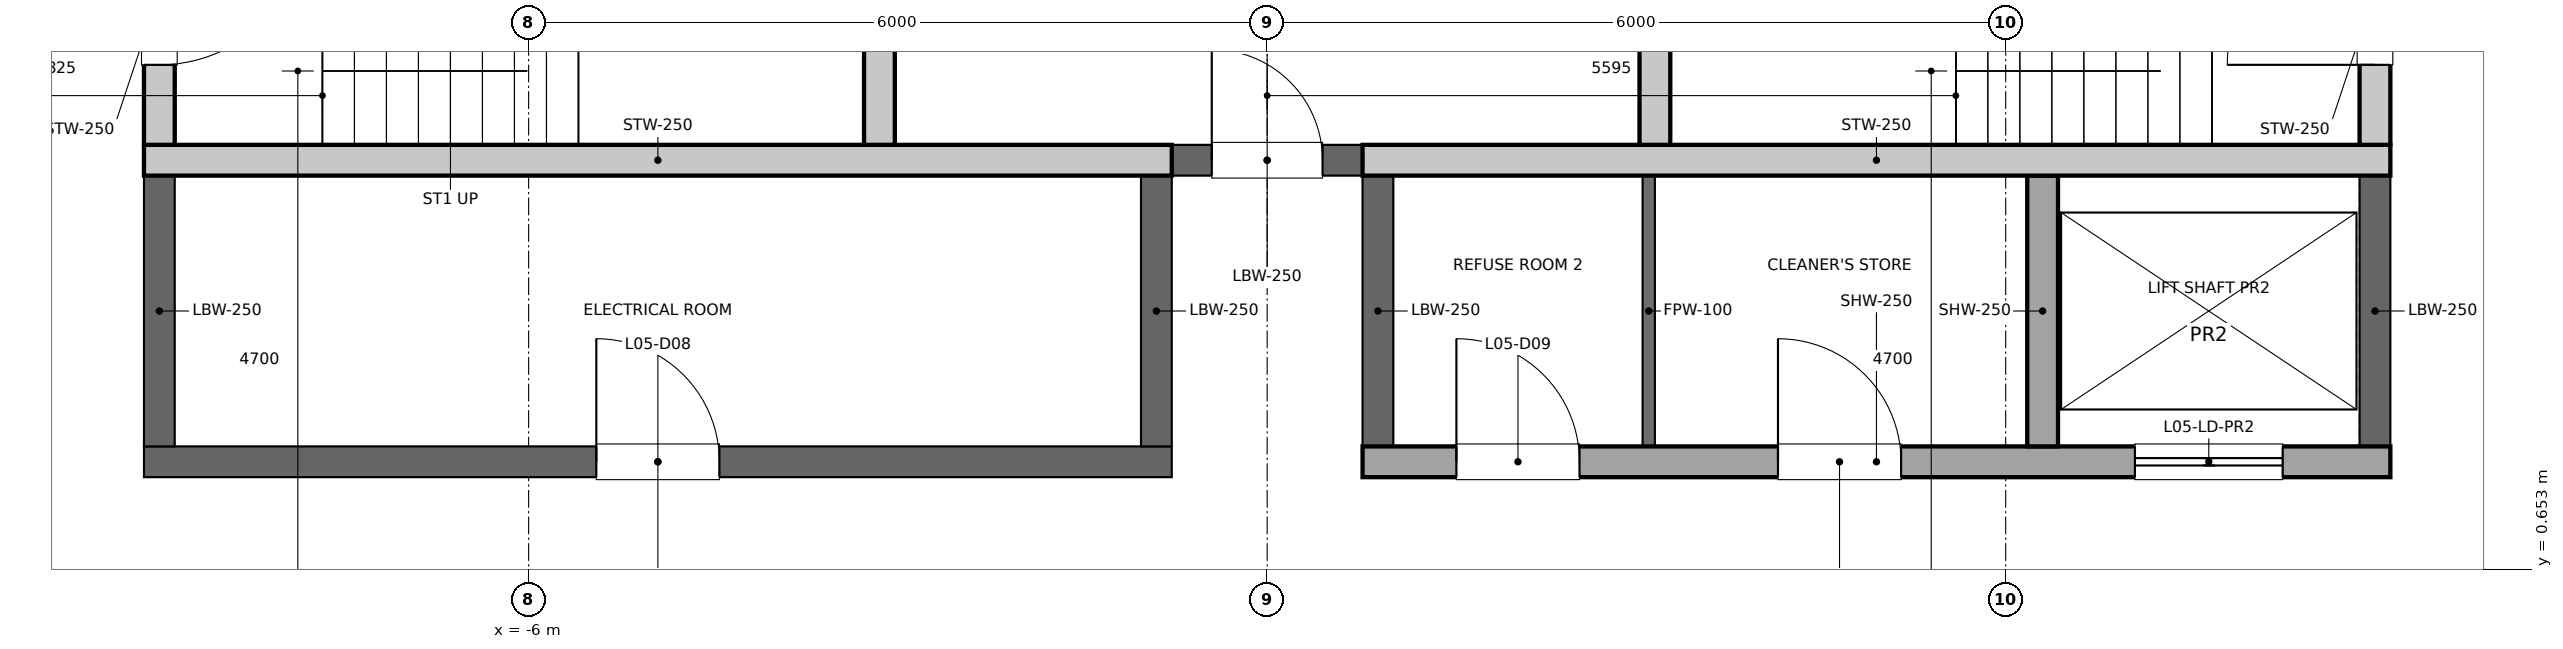
"""IFC4 building model, lengths in metres.
Left out: names, types, materials, properties, quantities, classifications, styles, units other than length and angle.
Written with IfcOpenShell. Run it as: python <this file> out.ifc"""

import sys

from ifc_helpers import new_model, si_unit, direction, frame, frame_2d, origin, place, context, subcontext, project, spatial, rectangle, extrude, element, fill, save


model = new_model("IFC4")
c1 = context("Model", 3, precision=1e-05, world=origin(), true_north=direction((0.0, 1.0)))
c2 = subcontext(c1, "Body", "Model", "MODEL_VIEW")
j1 = project(units=[si_unit("LENGTHUNIT", "METRE"), si_unit("PLANEANGLEUNIT", "RADIAN")], contexts=[c1])
p1 = place(None, origin())
s1 = spatial("IfcSite", under=j1, at=p1, CompositionType="ELEMENT")
p2 = place(p1, origin())
s2 = spatial("IfcBuilding", under=s1, at=p2, CompositionType="ELEMENT")
p3 = place(p2, frame((0.0, 0.0, 37.4)))
s3 = spatial("IfcBuildingStorey", under=s2, at=p3, CompositionType="ELEMENT", Elevation=37.4)
p4 = place(p3, frame((-9.0, 4.1, 0.0), z_axis=(0.0, 0.0, 1.0), x_axis=(0.0, 1.0, 0.0)))
e1 = element("IfcWall", 1, at=p4, inside=s3, PredefinedType="SOLIDWALL", context=c2, shape_type="SweptSolid", body=[
    extrude(rectangle(XDim=2.5, YDim=0.25, at=frame_2d((1.25, 0.0))), origin(), (0.0, 0.0, 1.0), 6.25),
])
p5 = place(p4, frame((0.65, 0.0, 0.0)))
e2 = element("IfcOpeningElement", 2, at=p5, cuts=e1, PredefinedType="OPENING", context=c2, shape_type="SweptSolid", body=[
    extrude(rectangle(XDim=1.2, YDim=2.1, at=frame_2d((0.6, 1.05))), frame((0.0, 0.125, 0.0), z_axis=(0.0, -1.0, 0.0), x_axis=(1.0, 0.0, 0.0)), (0.0, 0.0, 1.0), 0.25),
])
p6 = place(p3, frame((9.0, 4.1, 0.0), z_axis=(0.0, 0.0, 1.0), x_axis=(0.0, 1.0, 0.0)))
e3 = element("IfcWall", 3, at=p6, inside=s3, PredefinedType="SOLIDWALL", context=c2, shape_type="SweptSolid", body=[
    extrude(rectangle(XDim=2.5, YDim=0.25, at=frame_2d((1.25, 0.0))), origin(), (0.0, 0.0, 1.0), 6.25),
])
p7 = place(p6, frame((0.65, 0.0, 0.0)))
e4 = element("IfcOpeningElement", 4, at=p7, cuts=e3, PredefinedType="OPENING", context=c2, shape_type="SweptSolid", body=[
    extrude(rectangle(XDim=1.2, YDim=2.1, at=frame_2d((0.6, 1.05))), frame((0.0, 0.125, 0.0), z_axis=(0.0, -1.0, 0.0), x_axis=(1.0, 0.0, 0.0)), (0.0, 0.0, 1.0), 0.25),
])
for number, where, z_axis, x_axis in (
    (5, (-3.15, 4.1, 0.0), (0.0, 0.0, 1.0), (0.0, 1.0, 0.0)),
    (6, (3.15, 4.1, 0.0), (0.0, 0.0, 1.0), (0.0, 1.0, 0.0)),
):
    element("IfcWall", number, at=place(p3, frame(where, z_axis=z_axis, x_axis=x_axis)), inside=s3, PredefinedType="SOLIDWALL", context=c2, shape_type="SweptSolid", body=[
        extrude(rectangle(XDim=2.5, YDim=0.25, at=frame_2d((1.25, 0.0))), origin(), (0.0, 0.0, 1.0), 6.25),
    ])
p8 = place(p3, frame((-0.775, 3.975, 0.0), z_axis=(0.0, 0.0, 1.0), x_axis=(1.0, 0.0, 0.0)))
e7 = element("IfcWall", 7, at=p8, inside=s3, PredefinedType="PARTITIONING", context=c2, shape_type="SweptSolid", body=[
    extrude(rectangle(XDim=1.55, YDim=0.25, at=frame_2d((0.775, 0.0))), origin(), (0.0, 0.0, 1.0), 6.25),
])
p9 = place(p8, frame((0.325, 0.0, 0.0)))
e8 = element("IfcOpeningElement", 8, at=p9, cuts=e7, PredefinedType="OPENING", context=c2, shape_type="SweptSolid", body=[
    extrude(rectangle(XDim=0.9, YDim=2.1, at=frame_2d((0.45, 1.05))), frame((0.0, 0.125, 0.0), z_axis=(0.0, -1.0, 0.0), x_axis=(1.0, 0.0, 0.0)), (0.0, 0.0, 1.0), 0.25),
])
p10 = place(p3, frame((-9.125, 1.525, 0.0), z_axis=(0.0, 0.0, 1.0), x_axis=(1.0, 0.0, 0.0)))
e9 = element("IfcWall", 9, at=p10, inside=s3, PredefinedType="PARTITIONING", context=c2, shape_type="SweptSolid", body=[
    extrude(rectangle(XDim=8.35, YDim=0.25, at=frame_2d((4.175, 0.0))), origin(), (0.0, 0.0, 1.0), 6.25),
])
p11 = place(p10, frame((3.675, 0.0, 0.0)))
e10 = element("IfcOpeningElement", 10, at=p11, cuts=e9, PredefinedType="OPENING", context=c2, shape_type="SweptSolid", body=[
    extrude(rectangle(XDim=1.0, YDim=2.1, at=frame_2d((0.5, 1.05))), frame((0.0, 0.125, 0.0), z_axis=(0.0, -1.0, 0.0), x_axis=(1.0, 0.0, 0.0)), (0.0, 0.0, 1.0), 0.25),
])
p12 = place(p3, frame((0.775, 1.525, 0.0), z_axis=(0.0, 0.0, 1.0), x_axis=(1.0, 0.0, 0.0)))
e11 = element("IfcWall", 11, at=p12, inside=s3, PredefinedType="SOLIDWALL", context=c2, shape_type="SweptSolid", body=[
    extrude(rectangle(XDim=8.35, YDim=0.25, at=frame_2d((4.175, 0.0))), origin(), (0.0, 0.0, 1.0), 6.25),
])
p13 = place(p12, frame((6.275, 0.0, 0.0)))
e12 = element("IfcOpeningElement", 12, at=p13, cuts=e11, PredefinedType="OPENING", context=c2, shape_type="SweptSolid", body=[
    extrude(rectangle(XDim=1.2, YDim=2.1, at=frame_2d((0.6, 1.05))), frame((0.0, 0.125, 0.0), z_axis=(0.0, -1.0, 0.0), x_axis=(1.0, 0.0, 0.0)), (0.0, 0.0, 1.0), 0.25),
])
p14 = place(p12, frame((0.762, 0.0, 0.0)))
e13 = element("IfcOpeningElement", 13, at=p14, cuts=e11, PredefinedType="OPENING", context=c2, shape_type="SweptSolid", body=[
    extrude(rectangle(XDim=1.0, YDim=2.1, at=frame_2d((0.5, 1.05))), frame((0.0, 0.125, 0.0), z_axis=(0.0, -1.0, 0.0), x_axis=(1.0, 0.0, 0.0)), (0.0, 0.0, 1.0), 0.25),
])
p15 = place(p12, frame((3.375, 0.0, 0.0)))
e14 = element("IfcOpeningElement", 14, at=p15, cuts=e11, PredefinedType="OPENING", context=c2, shape_type="SweptSolid", body=[
    extrude(rectangle(XDim=1.0, YDim=2.1, at=frame_2d((0.5, 1.05))), frame((0.0, 0.125, 0.0), z_axis=(0.0, -1.0, 0.0), x_axis=(1.0, 0.0, 0.0)), (0.0, 0.0, 1.0), 0.25),
])
p16 = place(p3, frame((6.3, 1.65, 0.0), z_axis=(0.0, 0.0, 1.0), x_axis=(0.0, 1.0, 0.0)))
e15 = element("IfcWall", 15, at=p16, inside=s3, PredefinedType="SOLIDWALL", context=c2, shape_type="SweptSolid", body=[
    extrude(rectangle(XDim=2.2, YDim=0.25, at=frame_2d((1.1, 0.0))), origin(), (0.0, 0.0, 1.0), 6.25),
])
for number, where, z_axis, x_axis in (
    (16, (-9.125, 3.975, 0.0), (0.0, 0.0, 1.0), (1.0, 0.0, 0.0)),
    (17, (0.775, 3.975, 0.0), (0.0, 0.0, 1.0), (1.0, 0.0, 0.0)),
):
    element("IfcWall", number, at=place(p3, frame(where, z_axis=z_axis, x_axis=x_axis)), inside=s3, PredefinedType="SOLIDWALL", context=c2, shape_type="SweptSolid", body=[
        extrude(rectangle(XDim=8.35, YDim=0.25, at=frame_2d((4.175, 0.0))), origin(), (0.0, 0.0, 1.0), 6.25),
    ])
for number, where, z_axis, x_axis in (
    (18, (-9.0, 1.65, 0.0), (0.0, 0.0, 1.0), (0.0, 1.0, 0.0)),
    (19, (-0.9, 1.65, 0.0), (0.0, 0.0, 1.0), (0.0, 1.0, 0.0)),
    (20, (9.0, 1.65, 0.0), (0.0, 0.0, 1.0), (0.0, 1.0, 0.0)),
    (21, (0.9, 1.65, 0.0), (0.0, 0.0, 1.0), (0.0, 1.0, 0.0)),
):
    element("IfcWall", number, at=place(p3, frame(where, z_axis=z_axis, x_axis=x_axis)), inside=s3, PredefinedType="PARTITIONING", context=c2, shape_type="SweptSolid", body=[
        extrude(rectangle(XDim=2.2, YDim=0.25, at=frame_2d((1.1, 0.0))), origin(), (0.0, 0.0, 1.0), 6.25),
    ])
p17 = place(p3, frame((3.1, 1.65, 0.0), z_axis=(0.0, 0.0, 1.0), x_axis=(0.0, 1.0, 0.0)))
e22 = element("IfcWall", 22, at=p17, inside=s3, PredefinedType="PARTITIONING", context=c2, shape_type="SweptSolid", body=[
    extrude(rectangle(XDim=2.2, YDim=0.1, at=frame_2d((1.1, 0.0))), origin(), (0.0, 0.0, 1.0), 6.25),
])
p18 = place(p13, origin())
e23 = element("IfcDoor", 23, at=p18, inside=s3, OperationType="DOUBLE_DOOR_SLIDING", PredefinedType="DOOR", context=c2, shape_type="SweptSolid", body=[
    extrude(rectangle(XDim=1.2, YDim=2.1, at=frame_2d((0.6, 1.05))), frame((0.0, 0.025, 0.0), z_axis=(0.0, -1.0, 0.0), x_axis=(1.0, 0.0, 0.0)), (0.0, 0.0, 1.0), 0.05),
])
fill(e12, e23)
p19 = place(p5, origin())
e24 = element("IfcDoor", 24, at=p19, inside=s3, OperationType="SINGLE_SWING_RIGHT", PredefinedType="DOOR", context=c2, shape_type="SweptSolid", body=[
    extrude(rectangle(XDim=1.2, YDim=2.1, at=frame_2d((0.6, 1.05))), frame((0.0, 0.025, 0.0), z_axis=(0.0, -1.0, 0.0), x_axis=(1.0, 0.0, 0.0)), (0.0, 0.0, 1.0), 0.05),
])
fill(e2, e24)
p20 = place(p7, origin())
e25 = element("IfcDoor", 25, at=p20, inside=s3, OperationType="SINGLE_SWING_LEFT", PredefinedType="DOOR", context=c2, shape_type="SweptSolid", body=[
    extrude(rectangle(XDim=1.2, YDim=2.1, at=frame_2d((0.6, 1.05))), frame((0.0, 0.025, 0.0), z_axis=(0.0, -1.0, 0.0), x_axis=(1.0, 0.0, 0.0)), (0.0, 0.0, 1.0), 0.05),
])
fill(e4, e25)
p21 = place(p9, origin())
e26 = element("IfcDoor", 26, at=p21, inside=s3, OperationType="SINGLE_SWING_LEFT", PredefinedType="DOOR", context=c2, shape_type="SweptSolid", body=[
    extrude(rectangle(XDim=0.9, YDim=2.1, at=frame_2d((0.45, 1.05))), frame((0.0, 0.025, 0.0), z_axis=(0.0, -1.0, 0.0), x_axis=(1.0, 0.0, 0.0)), (0.0, 0.0, 1.0), 0.05),
])
fill(e8, e26)
p22 = place(p11, origin())
e27 = element("IfcDoor", 27, at=p22, inside=s3, OperationType="SINGLE_SWING_LEFT", PredefinedType="DOOR", context=c2, shape_type="SweptSolid", body=[
    extrude(rectangle(XDim=1.0, YDim=2.1, at=frame_2d((0.5, 1.05))), frame((0.0, 0.025, 0.0), z_axis=(0.0, -1.0, 0.0), x_axis=(1.0, 0.0, 0.0)), (0.0, 0.0, 1.0), 0.05),
])
fill(e10, e27)
p23 = place(p14, origin())
e28 = element("IfcDoor", 28, at=p23, inside=s3, OperationType="SINGLE_SWING_LEFT", PredefinedType="DOOR", context=c2, shape_type="SweptSolid", body=[
    extrude(rectangle(XDim=1.0, YDim=2.1, at=frame_2d((0.5, 1.05))), frame((0.0, 0.025, 0.0), z_axis=(0.0, -1.0, 0.0), x_axis=(1.0, 0.0, 0.0)), (0.0, 0.0, 1.0), 0.05),
])
fill(e13, e28)
p24 = place(p15, origin())
e29 = element("IfcDoor", 29, at=p24, inside=s3, OperationType="SINGLE_SWING_LEFT", PredefinedType="DOOR", context=c2, shape_type="SweptSolid", body=[
    extrude(rectangle(XDim=1.0, YDim=2.1, at=frame_2d((0.5, 1.05))), frame((0.0, 0.025, 0.0), z_axis=(0.0, -1.0, 0.0), x_axis=(1.0, 0.0, 0.0)), (0.0, 0.0, 1.0), 0.05),
])
fill(e14, e29)
save(model, sys.argv[1])
